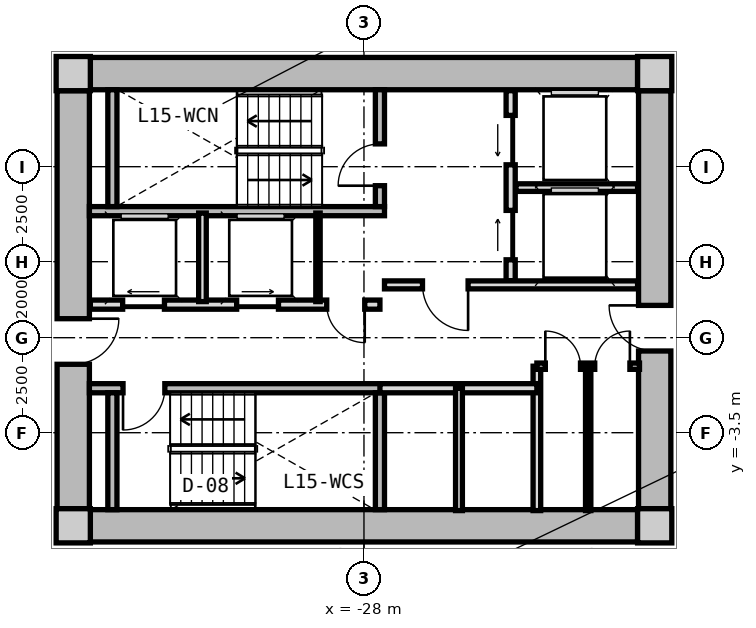
"""IFC4 building model, lengths in metres.
Left out: names, types, materials, properties, quantities, classifications, styles, units other than length and angle.
Written with IfcOpenShell. Run it as: python <this file> out.ifc"""

import sys

from ifc_helpers import new_model, si_unit, direction, frame, frame_2d, origin, origin_2d, place, context, subcontext, project, spatial, rectangle, extrude, source, transform, mapped, element, fill, save


model = new_model("IFC4")
c1 = context("Model", 3, precision=1e-05, world=origin(), true_north=direction((0.0, 1.0)))
c2 = subcontext(c1, "Body", "Model", "MODEL_VIEW")
j1 = project(units=[si_unit("LENGTHUNIT", "METRE"), si_unit("PLANEANGLEUNIT", "RADIAN")], contexts=[c1])
p1 = place(None, origin())
s1 = spatial("IfcSite", under=j1, at=p1, CompositionType="ELEMENT")
p2 = place(p1, origin())
s2 = spatial("IfcBuilding", under=s1, at=p2, CompositionType="ELEMENT")
p3 = place(p2, frame((0.0, 0.0, 52.1)))
s3 = spatial("IfcBuildingStorey", under=s2, at=p3, CompositionType="ELEMENT", Elevation=52.1)
m1 = source(origin(), c2, "Body", "SweptSolid", [
    extrude(rectangle(XDim=0.9, YDim=0.9, at=origin_2d()), origin(), (0.0, 0.0, 1.0), 3.05),
])
for number, where, z_axis, x_axis in (
    (1, (-35.65, -5.95, 0.0), (0.0, 0.0, 1.0), (1.0, 0.0, 0.0)),
    (2, (-20.35, -5.95, 0.0), (0.0, 0.0, 1.0), (1.0, 0.0, 0.0)),
    (3, (-20.35, 5.95, 0.0), (0.0, 0.0, 1.0), (1.0, 0.0, 0.0)),
    (4, (-35.65, 5.95, 0.0), (0.0, 0.0, 1.0), (1.0, 0.0, 0.0)),
):
    element("IfcColumn", number, at=place(p3, frame(where, z_axis=z_axis, x_axis=x_axis)), inside=s3, PredefinedType="COLUMN", context=c2, shape_type="MappedRepresentation", body=[
        mapped(m1, transform((0.0, 0.0, 0.0), x_axis=(1.0, 0.0, 0.0), y_axis=(0.0, 1.0, 0.0), z_axis=(0.0, 0.0, 1.0), scale=1.0)),
    ])
m2 = source(origin(), c2, "Body", "SweptSolid", [
    extrude(rectangle(XDim=14.4, YDim=0.85, at=frame_2d((7.2, 0.0))), origin(), (0.0, 0.0, 1.0), 2.79),
])
for number, where, z_axis, x_axis in (
    (5, (-35.2, 5.95, 0.0), (0.0, 0.0, 1.0), (1.0, 0.0, 0.0)),
    (6, (-20.8, -5.95, 0.0), (0.0, 0.0, 1.0), (-1.0, 0.0, 0.0)),
):
    element("IfcWall", number, at=place(p3, frame(where, z_axis=z_axis, x_axis=x_axis)), inside=s3, PredefinedType="SHEAR", context=c2, shape_type="MappedRepresentation", body=[
        mapped(m2, transform((0.0, 0.0, 0.0), x_axis=(1.0, 0.0, 0.0), y_axis=(0.0, 1.0, 0.0), z_axis=(0.0, 0.0, 1.0), scale=1.0)),
    ])
m3 = source(origin(), c2, "Body", "SweptSolid", [
    extrude(rectangle(XDim=11.0, YDim=0.85, at=frame_2d((5.5, 0.0))), origin(), (0.0, 0.0, 1.0), 2.79),
])
p4 = place(p3, frame((-35.65, -5.5, 0.0), z_axis=(0.0, 0.0, 1.0), x_axis=(0.0, 1.0, 0.0)))
e7 = element("IfcWall", 7, at=p4, inside=s3, PredefinedType="SHEAR", context=c2, shape_type="MappedRepresentation", body=[
    mapped(m3, transform((0.0, 0.0, 0.0), x_axis=(1.0, 0.0, 0.0), y_axis=(0.0, 1.0, 0.0), z_axis=(0.0, 0.0, 1.0), scale=1.0)),
])
p5 = place(p4, frame((3.8, 0.0, 0.0)))
e8 = element("IfcOpeningElement", 8, at=p5, cuts=e7, PredefinedType="OPENING", context=c2, shape_type="SweptSolid", body=[
    extrude(rectangle(XDim=1.2, YDim=2.15, at=frame_2d((0.6, 1.075))), frame((0.0, 0.435, 0.0), z_axis=(0.0, -1.0, 0.0), x_axis=(1.0, 0.0, 0.0)), (0.0, 0.0, 1.0), 0.87),
])
p6 = place(p3, frame((-20.35, 5.5, 0.0), z_axis=(0.0, 0.0, 1.0), x_axis=(0.0, -1.0, 0.0)))
e9 = element("IfcWall", 9, at=p6, inside=s3, PredefinedType="SHEAR", context=c2, shape_type="MappedRepresentation", body=[
    mapped(m3, transform((0.0, 0.0, 0.0), x_axis=(1.0, 0.0, 0.0), y_axis=(0.0, 1.0, 0.0), z_axis=(0.0, 0.0, 1.0), scale=1.0)),
])
p7 = place(p6, frame((5.65, 0.0, 0.0)))
e10 = element("IfcOpeningElement", 10, at=p7, cuts=e9, PredefinedType="OPENING", context=c2, shape_type="SweptSolid", body=[
    extrude(rectangle(XDim=1.2, YDim=2.15, at=frame_2d((0.6, 1.075))), frame((0.0, 0.435, 0.0), z_axis=(0.0, -1.0, 0.0), x_axis=(1.0, 0.0, 0.0)), (0.0, 0.0, 1.0), 0.87),
])
m4 = source(origin(), c2, "Body", "SweptSolid", [
    extrude(rectangle(XDim=7.765, YDim=0.24, at=frame_2d((3.883, 0.0))), origin(), (0.0, 0.0, 1.0), 2.79),
])
p8 = place(p3, frame((-35.225, 2.33, 0.0), z_axis=(0.0, 0.0, 1.0), x_axis=(1.0, 0.0, 0.0)))
e11 = element("IfcWall", 11, at=p8, inside=s3, PredefinedType="PARTITIONING", context=c2, shape_type="MappedRepresentation", body=[
    mapped(m4, transform((0.0, 0.0, 0.0), x_axis=(1.0, 0.0, 0.0), y_axis=(0.0, 1.0, 0.0), z_axis=(0.0, 0.0, 1.0), scale=1.0)),
])
m5 = source(origin(), c2, "Body", "SweptSolid", [
    extrude(rectangle(XDim=3.075, YDim=0.24, at=frame_2d((1.538, 0.0))), origin(), (0.0, 0.0, 1.0), 2.79),
])
p9 = place(p3, frame((-34.62, 2.45, 0.0), z_axis=(0.0, 0.0, 1.0), x_axis=(0.0, 1.0, 0.0)))
e12 = element("IfcWall", 12, at=p9, inside=s3, PredefinedType="PARTITIONING", context=c2, shape_type="MappedRepresentation", body=[
    mapped(m5, transform((0.0, 0.0, 0.0), x_axis=(1.0, 0.0, 0.0), y_axis=(0.0, 1.0, 0.0), z_axis=(0.0, 0.0, 1.0), scale=1.0)),
])
p10 = place(p3, frame((-27.58, 2.45, 0.0), z_axis=(0.0, 0.0, 1.0), x_axis=(0.0, 1.0, 0.0)))
e13 = element("IfcWall", 13, at=p10, inside=s3, PredefinedType="PARTITIONING", context=c2, shape_type="MappedRepresentation", body=[
    mapped(m5, transform((0.0, 0.0, 0.0), x_axis=(1.0, 0.0, 0.0), y_axis=(0.0, 1.0, 0.0), z_axis=(0.0, 0.0, 1.0), scale=1.0)),
])
p11 = place(p10, frame((0.55, 0.0, 0.0)))
e14 = element("IfcOpeningElement", 14, at=p11, cuts=e13, PredefinedType="OPENING", context=c2, shape_type="SweptSolid", body=[
    extrude(rectangle(XDim=1.1, YDim=2.15, at=frame_2d((0.55, 1.075))), frame((0.0, 0.13, 0.0), z_axis=(0.0, -1.0, 0.0), x_axis=(1.0, 0.0, 0.0)), (0.0, 0.0, 1.0), 0.26),
])
p12 = place(p3, frame((-35.225, -2.33, 0.0), z_axis=(0.0, 0.0, 1.0), x_axis=(1.0, 0.0, 0.0)))
e15 = element("IfcWall", 15, at=p12, inside=s3, PredefinedType="PARTITIONING", context=c2, shape_type="MappedRepresentation", body=[
    mapped(m4, transform((0.0, 0.0, 0.0), x_axis=(1.0, 0.0, 0.0), y_axis=(0.0, 1.0, 0.0), z_axis=(0.0, 0.0, 1.0), scale=1.0)),
])
p13 = place(p12, frame((0.885, 0.0, 0.0)))
e16 = element("IfcOpeningElement", 16, at=p13, cuts=e15, PredefinedType="OPENING", context=c2, shape_type="SweptSolid", body=[
    extrude(rectangle(XDim=1.1, YDim=2.15, at=frame_2d((0.55, 1.075))), frame((0.0, 0.13, 0.0), z_axis=(0.0, -1.0, 0.0), x_axis=(1.0, 0.0, 0.0)), (0.0, 0.0, 1.0), 0.26),
])
for number, where, z_axis, x_axis in (
    (17, (-34.62, -5.525, 0.0), (0.0, 0.0, 1.0), (0.0, 1.0, 0.0)),
    (18, (-27.58, -5.525, 0.0), (0.0, 0.0, 1.0), (0.0, 1.0, 0.0)),
):
    element("IfcWall", number, at=place(p3, frame(where, z_axis=z_axis, x_axis=x_axis)), inside=s3, PredefinedType="PARTITIONING", context=c2, shape_type="MappedRepresentation", body=[
        mapped(m5, transform((0.0, 0.0, 0.0), x_axis=(1.0, 0.0, 0.0), y_axis=(0.0, 1.0, 0.0), z_axis=(0.0, 0.0, 1.0), scale=1.0)),
    ])
m6 = source(origin(), c2, "Body", "SweptSolid", [
    extrude(rectangle(XDim=5.0, YDim=0.24, at=frame_2d((2.5, 0.0))), origin(), (0.0, 0.0, 1.0), 2.775),
])
p14 = place(p3, frame((-24.14, 0.5, 0.0), z_axis=(0.0, 0.0, 1.0), x_axis=(0.0, 1.0, 0.0)))
e19 = element("IfcWall", 19, at=p14, inside=s3, PredefinedType="PARTITIONING", context=c2, shape_type="MappedRepresentation", body=[
    mapped(m6, transform((0.0, 0.0, 0.0), x_axis=(1.0, 0.0, 0.0), y_axis=(0.0, 1.0, 0.0), z_axis=(0.0, 0.0, 1.0), scale=1.0)),
])
p15 = place(p14, frame((3.05, 0.0, 0.0)))
e20 = element("IfcOpeningElement", 20, at=p15, cuts=e19, PredefinedType="OPENING", context=c2, shape_type="SweptSolid", body=[
    extrude(rectangle(XDim=1.3, YDim=2.2, at=frame_2d((0.65, 1.1))), frame((0.0, 0.13, 0.0), z_axis=(0.0, -1.0, 0.0), x_axis=(1.0, 0.0, 0.0)), (0.0, 0.0, 1.0), 0.26),
])
p16 = place(p14, frame((0.55, 0.0, 0.0)))
e21 = element("IfcOpeningElement", 21, at=p16, cuts=e19, PredefinedType="OPENING", context=c2, shape_type="SweptSolid", body=[
    extrude(rectangle(XDim=1.3, YDim=2.2, at=frame_2d((0.65, 1.1))), frame((0.0, 0.13, 0.0), z_axis=(0.0, -1.0, 0.0), x_axis=(1.0, 0.0, 0.0)), (0.0, 0.0, 1.0), 0.26),
])
m7 = source(origin(), c2, "Body", "SweptSolid", [
    extrude(rectangle(XDim=3.2, YDim=0.2, at=frame_2d((1.6, 0.0))), origin(), (0.0, 0.0, 1.0), 2.775),
])
p17 = place(p3, frame((-24.0, 2.95, 0.0), z_axis=(0.0, 0.0, 1.0), x_axis=(1.0, 0.0, 0.0)))
e22 = element("IfcWall", 22, at=p17, inside=s3, PredefinedType="PARTITIONING", context=c2, shape_type="MappedRepresentation", body=[
    mapped(m7, transform((0.0, 0.0, 0.0), x_axis=(1.0, 0.0, 0.0), y_axis=(0.0, 1.0, 0.0), z_axis=(0.0, 0.0, 1.0), scale=1.0)),
])
m8 = source(origin(), c2, "Body", "SweptSolid", [
    extrude(rectangle(XDim=6.66, YDim=0.21, at=frame_2d((3.33, 0.0))), origin(), (0.0, 0.0, 1.0), 2.775),
])
p18 = place(p3, frame((-27.46, 0.39, 0.0), z_axis=(0.0, 0.0, 1.0), x_axis=(1.0, 0.0, 0.0)))
e23 = element("IfcWall", 23, at=p18, inside=s3, PredefinedType="PARTITIONING", context=c2, shape_type="MappedRepresentation", body=[
    mapped(m8, transform((0.0, 0.0, 0.0), x_axis=(1.0, 0.0, 0.0), y_axis=(0.0, 1.0, 0.0), z_axis=(0.0, 0.0, 1.0), scale=1.0)),
])
p19 = place(p18, frame((1.0, 0.0, 0.0)))
e24 = element("IfcOpeningElement", 24, at=p19, cuts=e23, PredefinedType="OPENING", context=c2, shape_type="SweptSolid", body=[
    extrude(rectangle(XDim=1.2, YDim=2.15, at=frame_2d((0.6, 1.075))), frame((0.0, 0.115, 0.0), z_axis=(0.0, -1.0, 0.0), x_axis=(1.0, 0.0, 0.0)), (0.0, 0.0, 1.0), 0.23),
])
m9 = source(origin(), c2, "Body", "SweptSolid", [
    extrude(rectangle(XDim=7.62, YDim=0.24, at=frame_2d((3.81, 0.0))), origin(), (0.0, 0.0, 1.0), 2.775),
])
p20 = place(p3, frame((-35.2, -0.13, 0.0), z_axis=(0.0, 0.0, 1.0), x_axis=(1.0, 0.0, 0.0)))
e25 = element("IfcWall", 25, at=p20, inside=s3, PredefinedType="PARTITIONING", context=c2, shape_type="MappedRepresentation", body=[
    mapped(m9, transform((0.0, 0.0, 0.0), x_axis=(1.0, 0.0, 0.0), y_axis=(0.0, 1.0, 0.0), z_axis=(0.0, 0.0, 1.0), scale=1.0)),
])
p21 = place(p20, frame((6.22, 0.0, 0.0)))
e26 = element("IfcOpeningElement", 26, at=p21, cuts=e25, PredefinedType="OPENING", context=c2, shape_type="SweptSolid", body=[
    extrude(rectangle(XDim=1.0, YDim=2.1, at=frame_2d((0.5, 1.05))), frame((0.0, 0.13, 0.0), z_axis=(0.0, -1.0, 0.0), x_axis=(1.0, 0.0, 0.0)), (0.0, 0.0, 1.0), 0.26),
])
p22 = place(p20, frame((0.85, 0.0, 0.0)))
e27 = element("IfcOpeningElement", 27, at=p22, cuts=e25, PredefinedType="OPENING", context=c2, shape_type="SweptSolid", body=[
    extrude(rectangle(XDim=1.1, YDim=2.2, at=frame_2d((0.55, 1.1))), frame((0.0, 0.13, 0.0), z_axis=(0.0, -1.0, 0.0), x_axis=(1.0, 0.0, 0.0)), (0.0, 0.0, 1.0), 0.26),
])
p23 = place(p20, frame((3.85, 0.0, 0.0)))
e28 = element("IfcOpeningElement", 28, at=p23, cuts=e25, PredefinedType="OPENING", context=c2, shape_type="SweptSolid", body=[
    extrude(rectangle(XDim=1.1, YDim=2.2, at=frame_2d((0.55, 1.1))), frame((0.0, 0.13, 0.0), z_axis=(0.0, -1.0, 0.0), x_axis=(1.0, 0.0, 0.0)), (0.0, 0.0, 1.0), 0.26),
])
m10 = source(origin(), c2, "Body", "SweptSolid", [
    extrude(rectangle(XDim=2.33, YDim=0.115, at=frame_2d((1.165, 0.0))), origin(), (0.0, 0.0, 1.0), 2.775),
])
p24 = place(p3, frame((-29.21, -0.05, 0.0), z_axis=(0.0, 0.0, 1.0), x_axis=(0.0, 1.0, 0.0)))
e29 = element("IfcWall", 29, at=p24, inside=s3, PredefinedType="PARTITIONING", context=c2, shape_type="MappedRepresentation", body=[
    mapped(m10, transform((0.0, 0.0, 0.0), x_axis=(1.0, 0.0, 0.0), y_axis=(0.0, 1.0, 0.0), z_axis=(0.0, 0.0, 1.0), scale=1.0)),
])
m11 = source(origin(), c2, "Body", "SweptSolid", [
    extrude(rectangle(XDim=2.33, YDim=0.2, at=frame_2d((1.165, 0.0))), origin(), (0.0, 0.0, 1.0), 2.775),
])
p25 = place(p3, frame((-32.25, -0.05, 0.0), z_axis=(0.0, 0.0, 1.0), x_axis=(0.0, 1.0, 0.0)))
e30 = element("IfcWall", 30, at=p25, inside=s3, PredefinedType="PARTITIONING", context=c2, shape_type="MappedRepresentation", body=[
    mapped(m11, transform((0.0, 0.0, 0.0), x_axis=(1.0, 0.0, 0.0), y_axis=(0.0, 1.0, 0.0), z_axis=(0.0, 0.0, 1.0), scale=1.0)),
])
m12 = source(origin(), c2, "Body", "SweptSolid", [
    extrude(rectangle(XDim=3.8, YDim=0.2, at=frame_2d((1.9, 0.0))), origin(), (0.0, 0.0, 1.0), 2.775),
])
p26 = place(p3, frame((-23.45, -5.55, 0.0), z_axis=(0.0, 0.0, 1.0), x_axis=(0.0, 1.0, 0.0)))
e31 = element("IfcWall", 31, at=p26, inside=s3, PredefinedType="PARTITIONING", context=c2, shape_type="MappedRepresentation", body=[
    mapped(m12, transform((0.0, 0.0, 0.0), x_axis=(1.0, 0.0, 0.0), y_axis=(0.0, 1.0, 0.0), z_axis=(0.0, 0.0, 1.0), scale=1.0)),
])
m13 = source(origin(), c2, "Body", "SweptSolid", [
    extrude(rectangle(XDim=4.13, YDim=0.24, at=frame_2d((2.065, 0.0))), origin(), (0.0, 0.0, 1.0), 2.775),
])
p27 = place(p3, frame((-27.58, -2.33, 0.0), z_axis=(0.0, 0.0, 1.0), x_axis=(1.0, 0.0, 0.0)))
e32 = element("IfcWall", 32, at=p27, inside=s3, PredefinedType="PARTITIONING", context=c2, shape_type="MappedRepresentation", body=[
    mapped(m13, transform((0.0, 0.0, 0.0), x_axis=(1.0, 0.0, 0.0), y_axis=(0.0, 1.0, 0.0), z_axis=(0.0, 0.0, 1.0), scale=1.0)),
])
m14 = source(origin(), c2, "Body", "SweptSolid", [
    extrude(rectangle(XDim=3.22, YDim=0.18, at=frame_2d((1.61, 0.0))), origin(), (0.0, 0.0, 1.0), 2.775),
])
p28 = place(p3, frame((-25.5, -5.55, 0.0), z_axis=(0.0, 0.0, 1.0), x_axis=(0.0, 1.0, 0.0)))
e33 = element("IfcWall", 33, at=p28, inside=s3, PredefinedType="PARTITIONING", context=c2, shape_type="MappedRepresentation", body=[
    mapped(m14, transform((0.0, 0.0, 0.0), x_axis=(1.0, 0.0, 0.0), y_axis=(0.0, 1.0, 0.0), z_axis=(0.0, 0.0, 1.0), scale=1.0)),
])
m15 = source(origin(), c2, "Body", "SweptSolid", [
    extrude(rectangle(XDim=2.7, YDim=0.165, at=frame_2d((1.35, 0.0))), origin(), (0.0, 0.0, 1.0), 2.775),
])
p29 = place(p3, frame((-23.45, -1.75, 0.0), z_axis=(0.0, 0.0, 1.0), x_axis=(1.0, 0.0, 0.0)))
e34 = element("IfcWall", 34, at=p29, inside=s3, PredefinedType="PARTITIONING", context=c2, shape_type="MappedRepresentation", body=[
    mapped(m15, transform((0.0, 0.0, 0.0), x_axis=(1.0, 0.0, 0.0), y_axis=(0.0, 1.0, 0.0), z_axis=(0.0, 0.0, 1.0), scale=1.0)),
])
p30 = place(p29, frame((0.222, 0.0, 0.0)))
e35 = element("IfcOpeningElement", 35, at=p30, cuts=e34, PredefinedType="OPENING", context=c2, shape_type="SweptSolid", body=[
    extrude(rectangle(XDim=0.925, YDim=2.1, at=frame_2d((0.462, 1.05))), frame((0.0, 0.093, 0.0), z_axis=(0.0, -1.0, 0.0), x_axis=(1.0, 0.0, 0.0)), (0.0, 0.0, 1.0), 0.185),
])
p31 = place(p29, frame((1.522, 0.0, 0.0)))
e36 = element("IfcOpeningElement", 36, at=p31, cuts=e34, PredefinedType="OPENING", context=c2, shape_type="SweptSolid", body=[
    extrude(rectangle(XDim=0.925, YDim=2.1, at=frame_2d((0.462, 1.05))), frame((0.0, 0.093, 0.0), z_axis=(0.0, -1.0, 0.0), x_axis=(1.0, 0.0, 0.0)), (0.0, 0.0, 1.0), 0.185),
])
m16 = source(origin(), c2, "Body", "SweptSolid", [
    extrude(rectangle(XDim=3.8, YDim=0.14, at=frame_2d((1.9, 0.0))), origin(), (0.0, 0.0, 1.0), 2.775),
])
p32 = place(p3, frame((-22.1, -5.55, 0.0), z_axis=(0.0, 0.0, 1.0), x_axis=(0.0, 1.0, 0.0)))
e37 = element("IfcWall", 37, at=p32, inside=s3, PredefinedType="PARTITIONING", context=c2, shape_type="MappedRepresentation", body=[
    mapped(m16, transform((0.0, 0.0, 0.0), x_axis=(1.0, 0.0, 0.0), y_axis=(0.0, 1.0, 0.0), z_axis=(0.0, 0.0, 1.0), scale=1.0)),
])
m17 = source(origin(), c2, "Body", "SweptSolid", [
    extrude(rectangle(XDim=1.1, YDim=2.15, at=frame_2d((0.55, 1.075))), frame((0.0, 0.025, 0.0), z_axis=(0.0, -1.0, 0.0), x_axis=(1.0, 0.0, 0.0)), (0.0, 0.0, 1.0), 0.05),
])
p33 = place(p11, origin())
e38 = element("IfcDoor", 38, at=p33, inside=s3, OperationType="SINGLE_SWING_LEFT", PredefinedType="DOOR", context=c2, shape_type="MappedRepresentation", body=[
    mapped(m17, transform((0.0, 0.0, 0.0), x_axis=(1.0, 0.0, 0.0), y_axis=(0.0, 1.0, 0.0), z_axis=(0.0, 0.0, 1.0), scale=1.0)),
])
fill(e14, e38)
p34 = place(p13, frame((1.1, 0.0, 0.0), z_axis=(0.0, 0.0, 1.0), x_axis=(-1.0, 0.0, 0.0)))
e39 = element("IfcDoor", 39, at=p34, inside=s3, OperationType="SINGLE_SWING_RIGHT", PredefinedType="DOOR", context=c2, shape_type="MappedRepresentation", body=[
    mapped(m17, transform((0.0, 0.0, 0.0), x_axis=(1.0, 0.0, 0.0), y_axis=(0.0, 1.0, 0.0), z_axis=(0.0, 0.0, 1.0), scale=1.0)),
])
fill(e16, e39)
m18 = source(origin(), c2, "Body", "SweptSolid", [
    extrude(rectangle(XDim=1.3, YDim=2.2, at=frame_2d((0.65, 1.1))), frame((0.0, 0.025, 0.0), z_axis=(0.0, -1.0, 0.0), x_axis=(1.0, 0.0, 0.0)), (0.0, 0.0, 1.0), 0.05),
])
p35 = place(p15, origin())
e40 = element("IfcDoor", 40, at=p35, inside=s3, OperationType="SLIDING_TO_LEFT", PredefinedType="DOOR", context=c2, shape_type="MappedRepresentation", body=[
    mapped(m18, transform((0.0, 0.0, 0.0), x_axis=(1.0, 0.0, 0.0), y_axis=(0.0, 1.0, 0.0), z_axis=(0.0, 0.0, 1.0), scale=1.0)),
])
fill(e20, e40)
p36 = place(p16, origin())
e41 = element("IfcDoor", 41, at=p36, inside=s3, OperationType="SLIDING_TO_RIGHT", PredefinedType="DOOR", context=c2, shape_type="MappedRepresentation", body=[
    mapped(m18, transform((0.0, 0.0, 0.0), x_axis=(1.0, 0.0, 0.0), y_axis=(0.0, 1.0, 0.0), z_axis=(0.0, 0.0, 1.0), scale=1.0)),
])
fill(e21, e41)
m19 = source(origin(), c2, "Body", "SweptSolid", [
    extrude(rectangle(XDim=1.2, YDim=2.15, at=frame_2d((0.6, 1.075))), frame((0.0, 0.025, 0.0), z_axis=(0.0, -1.0, 0.0), x_axis=(1.0, 0.0, 0.0)), (0.0, 0.0, 1.0), 0.05),
])
p37 = place(p19, frame((1.2, 0.0, 0.0), z_axis=(0.0, 0.0, 1.0), x_axis=(-1.0, 0.0, 0.0)))
e42 = element("IfcDoor", 42, at=p37, inside=s3, OperationType="SINGLE_SWING_LEFT", PredefinedType="DOOR", context=c2, shape_type="MappedRepresentation", body=[
    mapped(m19, transform((0.0, 0.0, 0.0), x_axis=(1.0, 0.0, 0.0), y_axis=(0.0, 1.0, 0.0), z_axis=(0.0, 0.0, 1.0), scale=1.0)),
])
fill(e24, e42)
p38 = place(p5, frame((1.2, 0.0, 0.0), z_axis=(0.0, 0.0, 1.0), x_axis=(-1.0, 0.0, 0.0)))
e43 = element("IfcDoor", 43, at=p38, inside=s3, OperationType="SINGLE_SWING_LEFT", PredefinedType="DOOR", context=c2, shape_type="MappedRepresentation", body=[
    mapped(m19, transform((0.0, 0.0, 0.0), x_axis=(1.0, 0.0, 0.0), y_axis=(0.0, 1.0, 0.0), z_axis=(0.0, 0.0, 1.0), scale=1.0)),
])
fill(e8, e43)
p39 = place(p7, frame((1.2, 0.0, 0.0), z_axis=(0.0, 0.0, 1.0), x_axis=(-1.0, 0.0, 0.0)))
e44 = element("IfcDoor", 44, at=p39, inside=s3, OperationType="SINGLE_SWING_RIGHT", PredefinedType="DOOR", context=c2, shape_type="MappedRepresentation", body=[
    mapped(m19, transform((0.0, 0.0, 0.0), x_axis=(1.0, 0.0, 0.0), y_axis=(0.0, 1.0, 0.0), z_axis=(0.0, 0.0, 1.0), scale=1.0)),
])
fill(e10, e44)
m20 = source(origin(), c2, "Body", "SweptSolid", [
    extrude(rectangle(XDim=1.0, YDim=2.1, at=frame_2d((0.5, 1.05))), frame((0.0, 0.025, 0.0), z_axis=(0.0, -1.0, 0.0), x_axis=(1.0, 0.0, 0.0)), (0.0, 0.0, 1.0), 0.05),
])
p40 = place(p21, frame((1.0, 0.0, 0.0), z_axis=(0.0, 0.0, 1.0), x_axis=(-1.0, 0.0, 0.0)))
e45 = element("IfcDoor", 45, at=p40, inside=s3, OperationType="SINGLE_SWING_LEFT", PredefinedType="DOOR", context=c2, shape_type="MappedRepresentation", body=[
    mapped(m20, transform((0.0, 0.0, 0.0), x_axis=(1.0, 0.0, 0.0), y_axis=(0.0, 1.0, 0.0), z_axis=(0.0, 0.0, 1.0), scale=1.0)),
])
fill(e26, e45)
m21 = source(origin(), c2, "Body", "SweptSolid", [
    extrude(rectangle(XDim=1.1, YDim=2.2, at=frame_2d((0.55, 1.1))), frame((0.0, 0.025, 0.0), z_axis=(0.0, -1.0, 0.0), x_axis=(1.0, 0.0, 0.0)), (0.0, 0.0, 1.0), 0.05),
])
p41 = place(p22, origin())
e46 = element("IfcDoor", 46, at=p41, inside=s3, OperationType="SLIDING_TO_LEFT", PredefinedType="DOOR", context=c2, shape_type="MappedRepresentation", body=[
    mapped(m21, transform((0.0, 0.0, 0.0), x_axis=(1.0, 0.0, 0.0), y_axis=(0.0, 1.0, 0.0), z_axis=(0.0, 0.0, 1.0), scale=1.0)),
])
fill(e27, e46)
p42 = place(p23, origin())
e47 = element("IfcDoor", 47, at=p42, inside=s3, OperationType="SLIDING_TO_RIGHT", PredefinedType="DOOR", context=c2, shape_type="MappedRepresentation", body=[
    mapped(m21, transform((0.0, 0.0, 0.0), x_axis=(1.0, 0.0, 0.0), y_axis=(0.0, 1.0, 0.0), z_axis=(0.0, 0.0, 1.0), scale=1.0)),
])
fill(e28, e47)
m22 = source(origin(), c2, "Body", "SweptSolid", [
    extrude(rectangle(XDim=0.925, YDim=2.1, at=frame_2d((0.462, 1.05))), frame((0.0, 0.025, 0.0), z_axis=(0.0, -1.0, 0.0), x_axis=(1.0, 0.0, 0.0)), (0.0, 0.0, 1.0), 0.05),
])
p43 = place(p30, origin())
e48 = element("IfcDoor", 48, at=p43, inside=s3, OperationType="SINGLE_SWING_LEFT", PredefinedType="DOOR", context=c2, shape_type="MappedRepresentation", body=[
    mapped(m22, transform((0.0, 0.0, 0.0), x_axis=(1.0, 0.0, 0.0), y_axis=(0.0, 1.0, 0.0), z_axis=(0.0, 0.0, 1.0), scale=1.0)),
])
fill(e35, e48)
p44 = place(p31, origin())
e49 = element("IfcDoor", 49, at=p44, inside=s3, OperationType="SINGLE_SWING_RIGHT", PredefinedType="DOOR", context=c2, shape_type="MappedRepresentation", body=[
    mapped(m22, transform((0.0, 0.0, 0.0), x_axis=(1.0, 0.0, 0.0), y_axis=(0.0, 1.0, 0.0), z_axis=(0.0, 0.0, 1.0), scale=1.0)),
])
fill(e36, e49)
save(model, sys.argv[1])
